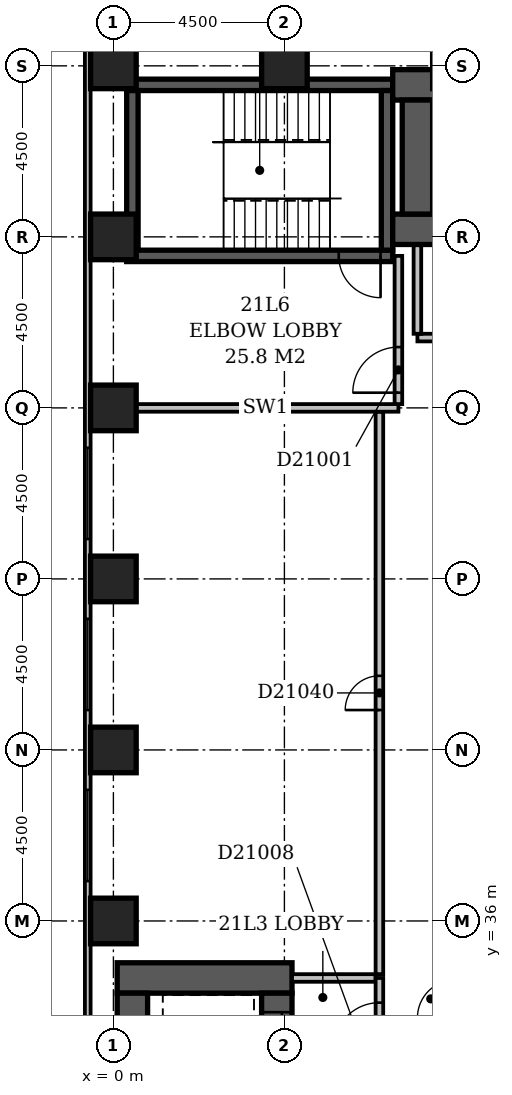
"""IFC4 building model, lengths in metres.
Left out: names, types, materials, properties, quantities, classifications, styles, units other than length and angle.
Written with IfcOpenShell. Run it as: python <this file> out.ifc"""

import sys

from ifc_helpers import new_model, si_unit, direction, frame, frame_2d, origin, origin_2d, place, context, subcontext, project, spatial, rectangle, extrude, element, fill, save


model = new_model("IFC4")
c1 = context("Model", 3, precision=1e-05, world=origin(), true_north=direction((0.0, 1.0)))
c2 = subcontext(c1, "Body", "Model", "MODEL_VIEW")
j1 = project(units=[si_unit("LENGTHUNIT", "METRE"), si_unit("PLANEANGLEUNIT", "RADIAN")], contexts=[c1])
p1 = place(None, origin())
s1 = spatial("IfcSite", under=j1, at=p1, CompositionType="ELEMENT")
p2 = place(p1, origin())
s2 = spatial("IfcBuilding", under=s1, at=p2, CompositionType="ELEMENT")
p3 = place(p2, frame((0.0, 0.0, 86.6)))
s3 = spatial("IfcBuildingStorey", under=s2, at=p3, CompositionType="ELEMENT", Elevation=86.6)
p4 = place(p3, frame((0.1, 34.5, -0.3), z_axis=(0.0, 0.0, 1.0), x_axis=(1.0, 0.0, 0.0)))
e1 = element("IfcWall", 1, at=p4, inside=s3, PredefinedType="SHEAR", context=c2, shape_type="SweptSolid", body=[
    extrude(rectangle(XDim=4.6, YDim=0.8, at=frame_2d((2.3, 0.0))), origin(), (0.0, 0.0, 1.0), 3.6),
])
p5 = place(p3, frame((0.35, 53.5, -0.3), z_axis=(0.0, 0.0, 1.0), x_axis=(1.0, 0.0, 0.0)))
e2 = element("IfcWall", 2, at=p5, inside=s3, PredefinedType="SHEAR", context=c2, shape_type="SweptSolid", body=[
    extrude(rectangle(XDim=7.0, YDim=0.3, at=frame_2d((3.5, 0.0))), origin(), (0.0, 0.0, 1.0), 3.6),
])
p6 = place(p5, frame((5.58, 0.0, 0.3)))
e3 = element("IfcOpeningElement", 3, at=p6, cuts=e2, PredefinedType="OPENING", context=c2, shape_type="SweptSolid", body=[
    extrude(rectangle(XDim=1.1, YDim=2.1, at=frame_2d((0.55, 1.05))), frame((0.0, 0.162, 0.0), z_axis=(0.0, -1.0, 0.0), x_axis=(1.0, 0.0, 0.0)), (0.0, 0.0, 1.0), 0.324),
])
p7 = place(p3, frame((0.35, 58.0, -0.3), z_axis=(0.0, 0.0, 1.0), x_axis=(1.0, 0.0, 0.0)))
e4 = element("IfcWall", 4, at=p7, inside=s3, PredefinedType="SHEAR", context=c2, shape_type="SweptSolid", body=[
    extrude(rectangle(XDim=7.0, YDim=0.3, at=frame_2d((3.5, 0.0))), origin(), (0.0, 0.0, 1.0), 3.6),
])
p8 = place(p3, frame((0.5, 27.15, -0.3), z_axis=(0.0, 0.0, 1.0), x_axis=(0.0, 1.0, 0.0)))
e5 = element("IfcWall", 5, at=p8, inside=s3, PredefinedType="SHEAR", context=c2, shape_type="SweptSolid", body=[
    extrude(rectangle(XDim=6.95, YDim=0.8, at=frame_2d((3.475, 0.0))), origin(), (0.0, 0.0, 1.0), 3.6),
])
p9 = place(p3, frame((0.5, 53.65, -0.3), z_axis=(0.0, 0.0, 1.0), x_axis=(0.0, 1.0, 0.0)))
e6 = element("IfcWall", 6, at=p9, inside=s3, PredefinedType="SHEAR", context=c2, shape_type="SweptSolid", body=[
    extrude(rectangle(XDim=4.2, YDim=0.3, at=frame_2d((2.1, 0.0))), origin(), (0.0, 0.0, 1.0), 3.6),
])
p10 = place(p3, frame((4.3, 27.15, -0.3), z_axis=(0.0, 0.0, 1.0), x_axis=(0.0, 1.0, 0.0)))
e7 = element("IfcWall", 7, at=p10, inside=s3, PredefinedType="SHEAR", context=c2, shape_type="SweptSolid", body=[
    extrude(rectangle(XDim=6.95, YDim=0.8, at=frame_2d((3.475, 0.0))), origin(), (0.0, 0.0, 1.0), 3.6),
])
p11 = place(p10, frame((3.05, 0.0, 0.3)))
e8 = element("IfcOpeningElement", 8, at=p11, cuts=e7, PredefinedType="OPENING", context=c2, shape_type="SweptSolid", body=[
    extrude(rectangle(XDim=1.1, YDim=2.1, at=frame_2d((0.55, 1.05))), frame((0.0, 0.412, 0.0), z_axis=(0.0, -1.0, 0.0), x_axis=(1.0, 0.0, 0.0)), (0.0, 0.0, 1.0), 0.824),
])
p12 = place(p10, frame((0.55, 0.0, 0.3)))
e9 = element("IfcOpeningElement", 9, at=p12, cuts=e7, PredefinedType="OPENING", context=c2, shape_type="SweptSolid", body=[
    extrude(rectangle(XDim=1.1, YDim=2.1, at=frame_2d((0.55, 1.05))), frame((0.0, 0.412, 0.0), z_axis=(0.0, -1.0, 0.0), x_axis=(1.0, 0.0, 0.0)), (0.0, 0.0, 1.0), 0.824),
])
p13 = place(p10, frame((5.35, 0.0, 0.3)))
e10 = element("IfcOpeningElement", 10, at=p13, cuts=e7, PredefinedType="OPENING", context=c2, shape_type="SweptSolid", body=[
    extrude(rectangle(XDim=1.1, YDim=2.1, at=frame_2d((0.55, 1.05))), frame((0.0, 0.412, 0.0), z_axis=(0.0, -1.0, 0.0), x_axis=(1.0, 0.0, 0.0)), (0.0, 0.0, 1.0), 0.824),
])
p14 = place(p3, frame((7.2, 53.65, -0.3), z_axis=(0.0, 0.0, 1.0), x_axis=(0.0, 1.0, 0.0)))
e11 = element("IfcWall", 11, at=p14, inside=s3, PredefinedType="SHEAR", context=c2, shape_type="SweptSolid", body=[
    extrude(rectangle(XDim=4.2, YDim=0.3, at=frame_2d((2.1, 0.0))), origin(), (0.0, 0.0, 1.0), 3.6),
])
p15 = place(p3, frame((7.35, 54.2, -0.3), z_axis=(0.0, 0.0, 1.0), x_axis=(1.0, 0.0, 0.0)))
e12 = element("IfcWall", 12, at=p15, inside=s3, PredefinedType="SHEAR", context=c2, shape_type="SweptSolid", body=[
    extrude(rectangle(XDim=16.45, YDim=0.8, at=frame_2d((8.225, 0.0))), origin(), (0.0, 0.0, 1.0), 3.6),
])
p16 = place(p15, frame((1.35, 0.0, 0.3)))
e13 = element("IfcOpeningElement", 13, at=p16, cuts=e12, PredefinedType="OPENING", context=c2, shape_type="SweptSolid", body=[
    extrude(rectangle(XDim=1.1, YDim=2.1, at=frame_2d((0.55, 1.05))), frame((0.0, 0.412, 0.0), z_axis=(0.0, -1.0, 0.0), x_axis=(1.0, 0.0, 0.0)), (0.0, 0.0, 1.0), 0.824),
])
p17 = place(p15, frame((3.85, 0.0, 0.3)))
e14 = element("IfcOpeningElement", 14, at=p17, cuts=e12, PredefinedType="OPENING", context=c2, shape_type="SweptSolid", body=[
    extrude(rectangle(XDim=1.1, YDim=2.1, at=frame_2d((0.55, 1.05))), frame((0.0, 0.412, 0.0), z_axis=(0.0, -1.0, 0.0), x_axis=(1.0, 0.0, 0.0)), (0.0, 0.0, 1.0), 0.824),
])
p18 = place(p15, frame((6.35, 0.0, 0.3)))
e15 = element("IfcOpeningElement", 15, at=p18, cuts=e12, PredefinedType="OPENING", context=c2, shape_type="SweptSolid", body=[
    extrude(rectangle(XDim=1.1, YDim=2.1, at=frame_2d((0.55, 1.05))), frame((0.0, 0.412, 0.0), z_axis=(0.0, -1.0, 0.0), x_axis=(1.0, 0.0, 0.0)), (0.0, 0.0, 1.0), 0.824),
])
p19 = place(p15, frame((8.85, 0.0, 0.3)))
e16 = element("IfcOpeningElement", 16, at=p19, cuts=e12, PredefinedType="OPENING", context=c2, shape_type="SweptSolid", body=[
    extrude(rectangle(XDim=1.1, YDim=2.1, at=frame_2d((0.55, 1.05))), frame((0.0, 0.412, 0.0), z_axis=(0.0, -1.0, 0.0), x_axis=(1.0, 0.0, 0.0)), (0.0, 0.0, 1.0), 0.824),
])
p20 = place(p15, frame((11.35, 0.0, 0.3)))
e17 = element("IfcOpeningElement", 17, at=p20, cuts=e12, PredefinedType="OPENING", context=c2, shape_type="SweptSolid", body=[
    extrude(rectangle(XDim=1.1, YDim=2.1, at=frame_2d((0.55, 1.05))), frame((0.0, 0.412, 0.0), z_axis=(0.0, -1.0, 0.0), x_axis=(1.0, 0.0, 0.0)), (0.0, 0.0, 1.0), 0.824),
])
p21 = place(p15, frame((13.85, 0.0, 0.3)))
e18 = element("IfcOpeningElement", 18, at=p21, cuts=e12, PredefinedType="OPENING", context=c2, shape_type="SweptSolid", body=[
    extrude(rectangle(XDim=1.1, YDim=2.1, at=frame_2d((0.55, 1.05))), frame((0.0, 0.412, 0.0), z_axis=(0.0, -1.0, 0.0), x_axis=(1.0, 0.0, 0.0)), (0.0, 0.0, 1.0), 0.824),
])
p22 = place(p3, frame((7.35, 58.0, -0.3), z_axis=(0.0, 0.0, 1.0), x_axis=(1.0, 0.0, 0.0)))
e19 = element("IfcWall", 19, at=p22, inside=s3, PredefinedType="SHEAR", context=c2, shape_type="SweptSolid", body=[
    extrude(rectangle(XDim=16.45, YDim=0.8, at=frame_2d((8.225, 0.0))), origin(), (0.0, 0.0, 1.0), 3.6),
])
p23 = place(p3, frame((8.0, 54.6, -0.3), z_axis=(0.0, 0.0, 1.0), x_axis=(0.0, 1.0, 0.0)))
e20 = element("IfcWall", 20, at=p23, inside=s3, PredefinedType="SHEAR", context=c2, shape_type="SweptSolid", body=[
    extrude(rectangle(XDim=3.0, YDim=0.8, at=frame_2d((1.5, 0.0))), origin(), (0.0, 0.0, 1.0), 3.6),
])
for number, where, z_axis, x_axis in (
    (21, (0.0, 36.0, -0.3), (0.0, 0.0, 1.0), (1.0, 0.0, 0.0)),
    (22, (0.0, 40.5, -0.3), (0.0, 0.0, 1.0), (1.0, 0.0, 0.0)),
    (23, (0.0, 45.0, -0.3), (0.0, 0.0, 1.0), (1.0, 0.0, 0.0)),
    (24, (0.0, 49.5, -0.3), (0.0, 0.0, 1.0), (1.0, 0.0, 0.0)),
    (25, (0.0, 54.0, -0.3), (0.0, 0.0, 1.0), (1.0, 0.0, 0.0)),
    (26, (0.0, 58.5, -0.3), (0.0, 0.0, 1.0), (1.0, 0.0, 0.0)),
    (27, (4.5, 58.5, -0.3), (0.0, 0.0, 1.0), (1.0, 0.0, 0.0)),
):
    element("IfcColumn", number, at=place(p3, frame(where, z_axis=z_axis, x_axis=x_axis)), inside=s3, PredefinedType="COLUMN", context=c2, shape_type="SweptSolid", body=[
        extrude(rectangle(XDim=1.2, YDim=1.2, at=origin_2d()), origin(), (0.0, 0.0, 1.0), 3.6),
    ])
p24 = place(p3, frame((-0.675, 59.1, 0.0), z_axis=(0.0, 0.0, 1.0), x_axis=(0.0, -1.0, 0.0)))
e28 = element("IfcWall", 28, at=p24, inside=s3, PredefinedType="STANDARD", context=c2, shape_type="SweptSolid", body=[
    extrude(rectangle(XDim=55.35, YDim=0.15, at=frame_2d((27.675, 0.0))), origin(), (0.0, 0.0, 1.0), 2.7),
])
p25 = place(p24, frame((10.65, 0.0, 0.6)))
e29 = element("IfcOpeningElement", 29, at=p25, cuts=e28, PredefinedType="OPENING", context=c2, shape_type="SweptSolid", body=[
    extrude(rectangle(XDim=2.4, YDim=1.8, at=frame_2d((1.2, 0.9))), frame((0.0, 0.087, 0.0), z_axis=(0.0, -1.0, 0.0), x_axis=(1.0, 0.0, 0.0)), (0.0, 0.0, 1.0), 0.174),
])
p26 = place(p24, frame((15.15, 0.0, 0.6)))
e30 = element("IfcOpeningElement", 30, at=p26, cuts=e28, PredefinedType="OPENING", context=c2, shape_type="SweptSolid", body=[
    extrude(rectangle(XDim=2.4, YDim=1.8, at=frame_2d((1.2, 0.9))), frame((0.0, 0.087, 0.0), z_axis=(0.0, -1.0, 0.0), x_axis=(1.0, 0.0, 0.0)), (0.0, 0.0, 1.0), 0.174),
])
p27 = place(p24, frame((19.65, 0.0, 0.6)))
e31 = element("IfcOpeningElement", 31, at=p27, cuts=e28, PredefinedType="OPENING", context=c2, shape_type="SweptSolid", body=[
    extrude(rectangle(XDim=2.4, YDim=1.8, at=frame_2d((1.2, 0.9))), frame((0.0, 0.087, 0.0), z_axis=(0.0, -1.0, 0.0), x_axis=(1.0, 0.0, 0.0)), (0.0, 0.0, 1.0), 0.174),
])
p28 = place(p3, frame((8.0, 51.35, 0.0), z_axis=(0.0, 0.0, 1.0), x_axis=(1.0, 0.0, 0.0)))
e32 = element("IfcWall", 32, at=p28, inside=s3, PredefinedType="PARTITIONING", context=c2, shape_type="SweptSolid", body=[
    extrude(rectangle(XDim=15.0, YDim=0.2, at=frame_2d((7.5, 0.0))), origin(), (0.0, 0.0, 1.0), 3.3),
])
p29 = place(p28, frame((3.4, 0.0, 0.0)))
e33 = element("IfcOpeningElement", 33, at=p29, cuts=e32, PredefinedType="OPENING", context=c2, shape_type="SweptSolid", body=[
    extrude(rectangle(XDim=1.2, YDim=2.1, at=frame_2d((0.6, 1.05))), frame((0.0, 0.112, 0.0), z_axis=(0.0, -1.0, 0.0), x_axis=(1.0, 0.0, 0.0)), (0.0, 0.0, 1.0), 0.224),
])
p30 = place(p28, frame((9.4, 0.0, 0.0)))
e34 = element("IfcOpeningElement", 34, at=p30, cuts=e32, PredefinedType="OPENING", context=c2, shape_type="SweptSolid", body=[
    extrude(rectangle(XDim=1.2, YDim=2.1, at=frame_2d((0.6, 1.05))), frame((0.0, 0.112, 0.0), z_axis=(0.0, -1.0, 0.0), x_axis=(1.0, 0.0, 0.0)), (0.0, 0.0, 1.0), 0.224),
])
p31 = place(p3, frame((8.0, 51.45, 0.0), z_axis=(0.0, 0.0, 1.0), x_axis=(0.0, 1.0, 0.0)))
e35 = element("IfcWall", 35, at=p31, inside=s3, PredefinedType="PARTITIONING", context=c2, shape_type="SweptSolid", body=[
    extrude(rectangle(XDim=2.33, YDim=0.2, at=frame_2d((1.165, 0.0))), origin(), (0.0, 0.0, 1.0), 3.3),
])
p32 = place(p3, frame((7.0, 32.1, 0.0), z_axis=(0.0, 0.0, 1.0), x_axis=(0.0, 1.0, 0.0)))
e36 = element("IfcWall", 36, at=p32, inside=s3, PredefinedType="PARTITIONING", context=c2, shape_type="SweptSolid", body=[
    extrude(rectangle(XDim=2.4, YDim=0.2, at=frame_2d((1.2, 0.0))), origin(), (0.0, 0.0, 1.0), 3.3),
])
p33 = place(p32, frame((0.55, 0.0, 0.0)))
e37 = element("IfcOpeningElement", 37, at=p33, cuts=e36, PredefinedType="OPENING", context=c2, shape_type="SweptSolid", body=[
    extrude(rectangle(XDim=1.2, YDim=2.1, at=frame_2d((0.6, 1.05))), frame((0.0, 0.112, 0.0), z_axis=(0.0, -1.0, 0.0), x_axis=(1.0, 0.0, 0.0)), (0.0, 0.0, 1.0), 0.224),
])
p34 = place(p3, frame((4.7, 34.5, 0.0), z_axis=(0.0, 0.0, 1.0), x_axis=(1.0, 0.0, 0.0)))
e38 = element("IfcWall", 38, at=p34, inside=s3, PredefinedType="PARTITIONING", context=c2, shape_type="SweptSolid", body=[
    extrude(rectangle(XDim=2.2, YDim=0.2, at=frame_2d((1.1, 0.0))), origin(), (0.0, 0.0, 1.0), 3.3),
])
p35 = place(p3, frame((0.5, 49.5, 0.0), z_axis=(0.0, 0.0, 1.0), x_axis=(1.0, 0.0, 0.0)))
e39 = element("IfcWall", 39, at=p35, inside=s3, PredefinedType="PARTITIONING", context=c2, shape_type="SweptSolid", body=[
    extrude(rectangle(XDim=7.0, YDim=0.2, at=frame_2d((3.5, 0.0))), origin(), (0.0, 0.0, 1.0), 3.3),
])
p36 = place(p3, frame((7.5, 49.6, 0.0), z_axis=(0.0, 0.0, 1.0), x_axis=(0.0, 1.0, 0.0)))
e40 = element("IfcWall", 40, at=p36, inside=s3, PredefinedType="PARTITIONING", context=c2, shape_type="SweptSolid", body=[
    extrude(rectangle(XDim=3.9, YDim=0.2, at=frame_2d((1.95, 0.0))), origin(), (0.0, 0.0, 1.0), 3.3),
])
p37 = place(p36, frame((0.3, 0.0, 0.0)))
e41 = element("IfcOpeningElement", 41, at=p37, cuts=e40, PredefinedType="OPENING", context=c2, shape_type="SweptSolid", body=[
    extrude(rectangle(XDim=1.2, YDim=2.1, at=frame_2d((0.6, 1.05))), frame((0.0, 0.112, 0.0), z_axis=(0.0, -1.0, 0.0), x_axis=(1.0, 0.0, 0.0)), (0.0, 0.0, 1.0), 0.224),
])
p38 = place(p3, frame((7.0, 34.6, 0.0), z_axis=(0.0, 0.0, 1.0), x_axis=(0.0, 1.0, 0.0)))
e42 = element("IfcWall", 42, at=p38, inside=s3, PredefinedType="PARTITIONING", context=c2, shape_type="SweptSolid", body=[
    extrude(rectangle(XDim=14.8, YDim=0.2, at=frame_2d((7.4, 0.0))), origin(), (0.0, 0.0, 1.0), 3.3),
])
p39 = place(p38, frame((6.95, 0.0, 0.0)))
e43 = element("IfcOpeningElement", 43, at=p39, cuts=e42, PredefinedType="OPENING", context=c2, shape_type="SweptSolid", body=[
    extrude(rectangle(XDim=0.9, YDim=2.1, at=frame_2d((0.45, 1.05))), frame((0.0, 0.112, 0.0), z_axis=(0.0, -1.0, 0.0), x_axis=(1.0, 0.0, 0.0)), (0.0, 0.0, 1.0), 0.224),
])
p40 = place(p25, origin())
e44 = element("IfcWindow", 44, at=p40, inside=s3, PartitioningType="SINGLE_PANEL", PredefinedType="WINDOW", context=c2, shape_type="SweptSolid", body=[
    extrude(rectangle(XDim=2.4, YDim=1.8, at=frame_2d((1.2, 0.9))), frame((0.0, 0.03, 0.0), z_axis=(0.0, -1.0, 0.0), x_axis=(1.0, 0.0, 0.0)), (0.0, 0.0, 1.0), 0.06),
])
fill(e29, e44)
p41 = place(p26, origin())
e45 = element("IfcWindow", 45, at=p41, inside=s3, PartitioningType="SINGLE_PANEL", PredefinedType="WINDOW", context=c2, shape_type="SweptSolid", body=[
    extrude(rectangle(XDim=2.4, YDim=1.8, at=frame_2d((1.2, 0.9))), frame((0.0, 0.03, 0.0), z_axis=(0.0, -1.0, 0.0), x_axis=(1.0, 0.0, 0.0)), (0.0, 0.0, 1.0), 0.06),
])
fill(e30, e45)
p42 = place(p27, origin())
e46 = element("IfcWindow", 46, at=p42, inside=s3, PartitioningType="SINGLE_PANEL", PredefinedType="WINDOW", context=c2, shape_type="SweptSolid", body=[
    extrude(rectangle(XDim=2.4, YDim=1.8, at=frame_2d((1.2, 0.9))), frame((0.0, 0.03, 0.0), z_axis=(0.0, -1.0, 0.0), x_axis=(1.0, 0.0, 0.0)), (0.0, 0.0, 1.0), 0.06),
])
fill(e31, e46)
p43 = place(p37, origin())
e47 = element("IfcDoor", 47, at=p43, inside=s3, OperationType="SINGLE_SWING_LEFT", PredefinedType="DOOR", context=c2, shape_type="SweptSolid", body=[
    extrude(rectangle(XDim=1.2, YDim=2.1, at=frame_2d((0.6, 1.05))), frame((0.0, 0.025, 0.0), z_axis=(0.0, -1.0, 0.0), x_axis=(1.0, 0.0, 0.0)), (0.0, 0.0, 1.0), 0.05),
])
fill(e41, e47)
p44 = place(p33, origin())
e48 = element("IfcDoor", 48, at=p44, inside=s3, OperationType="SINGLE_SWING_LEFT", PredefinedType="DOOR", context=c2, shape_type="SweptSolid", body=[
    extrude(rectangle(XDim=1.2, YDim=2.1, at=frame_2d((0.6, 1.05))), frame((0.0, 0.025, 0.0), z_axis=(0.0, -1.0, 0.0), x_axis=(1.0, 0.0, 0.0)), (0.0, 0.0, 1.0), 0.05),
])
fill(e37, e48)
p45 = place(p13, origin())
e49 = element("IfcDoor", 49, at=p45, inside=s3, OperationType="SLIDING_TO_LEFT", PredefinedType="DOOR", context=c2, shape_type="SweptSolid", body=[
    extrude(rectangle(XDim=1.1, YDim=2.1, at=frame_2d((0.55, 1.05))), frame((0.0, 0.025, 0.0), z_axis=(0.0, -1.0, 0.0), x_axis=(1.0, 0.0, 0.0)), (0.0, 0.0, 1.0), 0.05),
])
fill(e10, e49)
p46 = place(p6, origin())
e50 = element("IfcDoor", 50, at=p46, inside=s3, OperationType="SINGLE_SWING_RIGHT", PredefinedType="DOOR", context=c2, shape_type="SweptSolid", body=[
    extrude(rectangle(XDim=1.1, YDim=2.1, at=frame_2d((0.55, 1.05))), frame((0.0, 0.025, 0.0), z_axis=(0.0, -1.0, 0.0), x_axis=(1.0, 0.0, 0.0)), (0.0, 0.0, 1.0), 0.05),
])
fill(e3, e50)
p47 = place(p39, origin())
e51 = element("IfcDoor", 51, at=p47, inside=s3, OperationType="SINGLE_SWING_LEFT", PredefinedType="DOOR", context=c2, shape_type="SweptSolid", body=[
    extrude(rectangle(XDim=0.9, YDim=2.1, at=frame_2d((0.45, 1.05))), frame((0.0, 0.025, 0.0), z_axis=(0.0, -1.0, 0.0), x_axis=(1.0, 0.0, 0.0)), (0.0, 0.0, 1.0), 0.05),
])
fill(e43, e51)
save(model, sys.argv[1])
